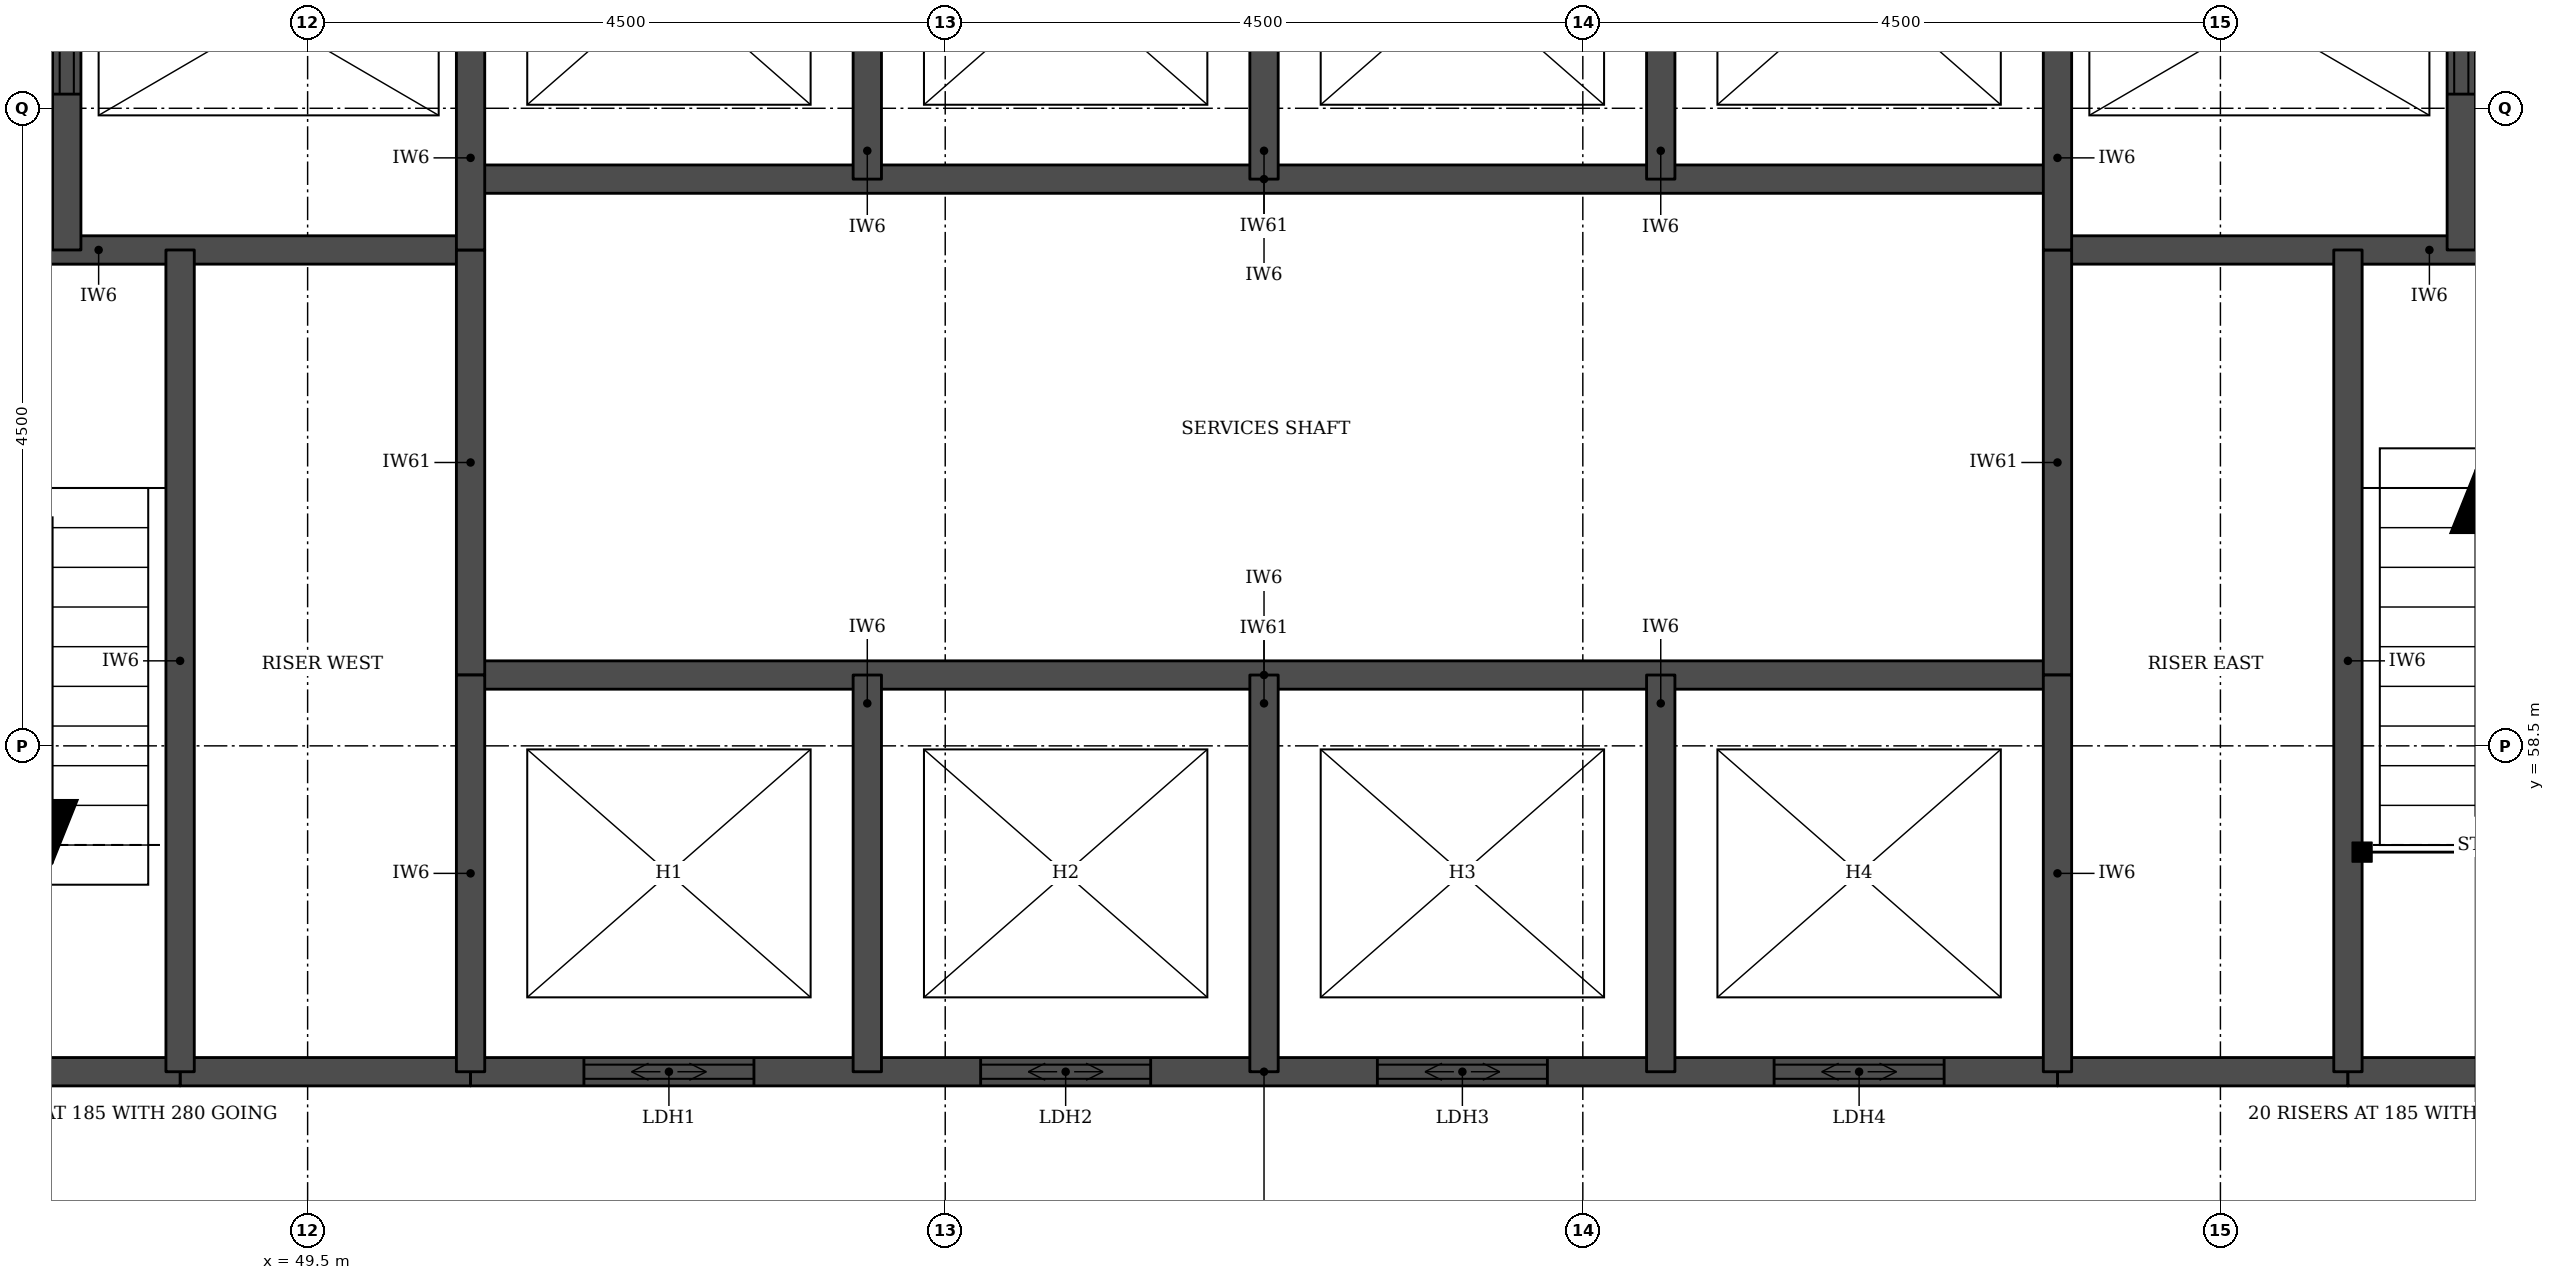
"""IFC4 building model, lengths in metres.
Left out: names, types, materials, properties, quantities, classifications, styles, units other than length and angle.
Written with IfcOpenShell. Run it as: python <this file> out.ifc"""

import sys

from ifc_helpers import new_model, si_unit, direction, frame, frame_2d, origin, place, context, subcontext, project, spatial, rectangle, extrude, element, fill, save


model = new_model("IFC4")
c1 = context("Model", 3, precision=1e-05, world=origin(), true_north=direction((0.0, 1.0)))
c2 = subcontext(c1, "Body", "Model", "MODEL_VIEW")
j1 = project(units=[si_unit("LENGTHUNIT", "METRE"), si_unit("PLANEANGLEUNIT", "RADIAN")], contexts=[c1])
p1 = place(None, origin())
s1 = spatial("IfcSite", under=j1, at=p1, CompositionType="ELEMENT")
p2 = place(p1, origin())
s2 = spatial("IfcBuilding", under=s1, at=p2, CompositionType="ELEMENT")
p3 = place(p2, frame((0.0, 0.0, 260.0)))
s3 = spatial("IfcBuildingStorey", under=s2, at=p3, CompositionType="ELEMENT", Elevation=260.0)
for number, where, z_axis, x_axis in (
    (1, (48.6, 56.2, 0.0), (0.0, 0.0, 1.0), (1.0, 0.0, 0.0)),
    (2, (61.85, 56.2, 0.0), (0.0, 0.0, 1.0), (1.0, 0.0, 0.0)),
):
    element("IfcWall", number, at=place(p3, frame(where, z_axis=z_axis, x_axis=x_axis)), inside=s3, PredefinedType="SOLIDWALL", context=c2, shape_type="SweptSolid", body=[
        extrude(rectangle(XDim=2.05, YDim=0.2, at=frame_2d((1.025, 0.0))), origin(), (0.0, 0.0, 1.0), 3.45),
    ])
p4 = place(p3, frame((45.4, 56.2, 0.0), z_axis=(0.0, 0.0, 1.0), x_axis=(1.0, 0.0, 0.0)))
e3 = element("IfcWall", 3, at=p4, inside=s3, PredefinedType="SOLIDWALL", context=c2, shape_type="SweptSolid", body=[
    extrude(rectangle(XDim=3.2, YDim=0.2, at=frame_2d((1.6, 0.0))), origin(), (0.0, 0.0, 1.0), 3.45),
])
p5 = place(p3, frame((50.65, 56.2, 0.0), z_axis=(0.0, 0.0, 1.0), x_axis=(1.0, 0.0, 0.0)))
e4 = element("IfcWall", 4, at=p5, inside=s3, PredefinedType="SOLIDWALL", context=c2, shape_type="SweptSolid", body=[
    extrude(rectangle(XDim=11.2, YDim=0.2, at=frame_2d((5.6, 0.0))), origin(), (0.0, 0.0, 1.0), 3.45),
])
p6 = place(p5, frame((0.8, 0.0, 0.0)))
e5 = element("IfcOpeningElement", 5, at=p6, cuts=e4, PredefinedType="OPENING", context=c2, shape_type="SweptSolid", body=[
    extrude(rectangle(XDim=1.2, YDim=2.1, at=frame_2d((0.6, 1.05))), frame((0.0, 0.11, 0.0), z_axis=(0.0, -1.0, 0.0), x_axis=(1.0, 0.0, 0.0)), (0.0, 0.0, 1.0), 0.22),
])
p7 = place(p5, frame((3.6, 0.0, 0.0)))
e6 = element("IfcOpeningElement", 6, at=p7, cuts=e4, PredefinedType="OPENING", context=c2, shape_type="SweptSolid", body=[
    extrude(rectangle(XDim=1.2, YDim=2.1, at=frame_2d((0.6, 1.05))), frame((0.0, 0.11, 0.0), z_axis=(0.0, -1.0, 0.0), x_axis=(1.0, 0.0, 0.0)), (0.0, 0.0, 1.0), 0.22),
])
p8 = place(p5, frame((6.4, 0.0, 0.0)))
e7 = element("IfcOpeningElement", 7, at=p8, cuts=e4, PredefinedType="OPENING", context=c2, shape_type="SweptSolid", body=[
    extrude(rectangle(XDim=1.2, YDim=2.1, at=frame_2d((0.6, 1.05))), frame((0.0, 0.11, 0.0), z_axis=(0.0, -1.0, 0.0), x_axis=(1.0, 0.0, 0.0)), (0.0, 0.0, 1.0), 0.22),
])
p9 = place(p5, frame((9.2, 0.0, 0.0)))
e8 = element("IfcOpeningElement", 8, at=p9, cuts=e4, PredefinedType="OPENING", context=c2, shape_type="SweptSolid", body=[
    extrude(rectangle(XDim=1.2, YDim=2.1, at=frame_2d((0.6, 1.05))), frame((0.0, 0.11, 0.0), z_axis=(0.0, -1.0, 0.0), x_axis=(1.0, 0.0, 0.0)), (0.0, 0.0, 1.0), 0.22),
])
p10 = place(p3, frame((63.9, 56.2, 0.0), z_axis=(0.0, 0.0, 1.0), x_axis=(1.0, 0.0, 0.0)))
e9 = element("IfcWall", 9, at=p10, inside=s3, PredefinedType="SOLIDWALL", context=c2, shape_type="SweptSolid", body=[
    extrude(rectangle(XDim=3.2, YDim=0.2, at=frame_2d((1.6, 0.0))), origin(), (0.0, 0.0, 1.0), 3.45),
])
p11 = place(p3, frame((50.65, 59.0, 0.0), z_axis=(0.0, 0.0, 1.0), x_axis=(1.0, 0.0, 0.0)))
e10 = element("IfcWall", 10, at=p11, inside=s3, PredefinedType="SOLIDWALL", context=c2, shape_type="SweptSolid", body=[
    extrude(rectangle(XDim=11.2, YDim=0.2, at=frame_2d((5.6, 0.0))), origin(), (0.0, 0.0, 1.0), 3.7),
])
for number, where, z_axis, x_axis in (
    (11, (45.4, 62.0, 0.0), (0.0, 0.0, 1.0), (1.0, 0.0, 0.0)),
    (12, (61.85, 62.0, 0.0), (0.0, 0.0, 1.0), (1.0, 0.0, 0.0)),
):
    element("IfcWall", number, at=place(p3, frame(where, z_axis=z_axis, x_axis=x_axis)), inside=s3, PredefinedType="SOLIDWALL", context=c2, shape_type="SweptSolid", body=[
        extrude(rectangle(XDim=5.25, YDim=0.2, at=frame_2d((2.625, 0.0))), origin(), (0.0, 0.0, 1.0), 3.45),
    ])
p12 = place(p3, frame((50.65, 62.5, 0.0), z_axis=(0.0, 0.0, 1.0), x_axis=(1.0, 0.0, 0.0)))
e13 = element("IfcWall", 13, at=p12, inside=s3, PredefinedType="SOLIDWALL", context=c2, shape_type="SweptSolid", body=[
    extrude(rectangle(XDim=11.2, YDim=0.2, at=frame_2d((5.6, 0.0))), origin(), (0.0, 0.0, 1.0), 3.7),
])
p13 = place(p3, frame((47.8, 62.0, 0.0), z_axis=(0.0, 0.0, 1.0), x_axis=(0.0, 1.0, 0.0)))
e14 = element("IfcWall", 14, at=p13, inside=s3, PredefinedType="SOLIDWALL", context=c2, shape_type="SweptSolid", body=[
    extrude(rectangle(XDim=3.3, YDim=0.2, at=frame_2d((1.65, 0.0))), origin(), (0.0, 0.0, 1.0), 3.45),
])
p14 = place(p13, frame((1.1, 0.0, 0.0)))
e15 = element("IfcOpeningElement", 15, at=p14, cuts=e14, PredefinedType="OPENING", context=c2, shape_type="SweptSolid", body=[
    extrude(rectangle(XDim=1.1, YDim=2.1, at=frame_2d((0.55, 1.05))), frame((0.0, 0.11, 0.0), z_axis=(0.0, -1.0, 0.0), x_axis=(1.0, 0.0, 0.0)), (0.0, 0.0, 1.0), 0.22),
])
p15 = place(p3, frame((48.6, 56.2, 0.0), z_axis=(0.0, 0.0, 1.0), x_axis=(0.0, 1.0, 0.0)))
e16 = element("IfcWall", 16, at=p15, inside=s3, PredefinedType="SOLIDWALL", context=c2, shape_type="SweptSolid", body=[
    extrude(rectangle(XDim=5.8, YDim=0.2, at=frame_2d((2.9, 0.0))), origin(), (0.0, 0.0, 1.0), 3.45),
])
p16 = place(p3, frame((50.65, 59.0, 0.0), z_axis=(0.0, 0.0, 1.0), x_axis=(0.0, 1.0, 0.0)))
e17 = element("IfcWall", 17, at=p16, inside=s3, PredefinedType="SOLIDWALL", context=c2, shape_type="SweptSolid", body=[
    extrude(rectangle(XDim=3.0, YDim=0.2, at=frame_2d((1.5, 0.0))), origin(), (0.0, 0.0, 1.0), 3.7),
])
p17 = place(p3, frame((50.65, 56.2, 0.0), z_axis=(0.0, 0.0, 1.0), x_axis=(0.0, 1.0, 0.0)))
e18 = element("IfcWall", 18, at=p17, inside=s3, PredefinedType="SOLIDWALL", context=c2, shape_type="SweptSolid", body=[
    extrude(rectangle(XDim=2.8, YDim=0.2, at=frame_2d((1.4, 0.0))), origin(), (0.0, 0.0, 1.0), 3.45),
])
p18 = place(p3, frame((50.65, 62.0, 0.0), z_axis=(0.0, 0.0, 1.0), x_axis=(0.0, 1.0, 0.0)))
e19 = element("IfcWall", 19, at=p18, inside=s3, PredefinedType="SOLIDWALL", context=c2, shape_type="SweptSolid", body=[
    extrude(rectangle(XDim=3.3, YDim=0.2, at=frame_2d((1.65, 0.0))), origin(), (0.0, 0.0, 1.0), 3.45),
])
for number, where, z_axis, x_axis in (
    (20, (53.45, 56.2, 0.0), (0.0, 0.0, 1.0), (0.0, 1.0, 0.0)),
    (21, (53.45, 62.5, 0.0), (0.0, 0.0, 1.0), (0.0, 1.0, 0.0)),
    (22, (56.25, 56.2, 0.0), (0.0, 0.0, 1.0), (0.0, 1.0, 0.0)),
    (23, (56.25, 62.5, 0.0), (0.0, 0.0, 1.0), (0.0, 1.0, 0.0)),
    (24, (59.05, 56.2, 0.0), (0.0, 0.0, 1.0), (0.0, 1.0, 0.0)),
    (25, (59.05, 62.5, 0.0), (0.0, 0.0, 1.0), (0.0, 1.0, 0.0)),
):
    element("IfcWall", number, at=place(p3, frame(where, z_axis=z_axis, x_axis=x_axis)), inside=s3, PredefinedType="SOLIDWALL", context=c2, shape_type="SweptSolid", body=[
        extrude(rectangle(XDim=2.8, YDim=0.2, at=frame_2d((1.4, 0.0))), origin(), (0.0, 0.0, 1.0), 3.45),
    ])
p19 = place(p3, frame((61.85, 59.0, 0.0), z_axis=(0.0, 0.0, 1.0), x_axis=(0.0, 1.0, 0.0)))
e26 = element("IfcWall", 26, at=p19, inside=s3, PredefinedType="SOLIDWALL", context=c2, shape_type="SweptSolid", body=[
    extrude(rectangle(XDim=3.0, YDim=0.2, at=frame_2d((1.5, 0.0))), origin(), (0.0, 0.0, 1.0), 3.7),
])
p20 = place(p3, frame((61.85, 56.2, 0.0), z_axis=(0.0, 0.0, 1.0), x_axis=(0.0, 1.0, 0.0)))
e27 = element("IfcWall", 27, at=p20, inside=s3, PredefinedType="SOLIDWALL", context=c2, shape_type="SweptSolid", body=[
    extrude(rectangle(XDim=2.8, YDim=0.2, at=frame_2d((1.4, 0.0))), origin(), (0.0, 0.0, 1.0), 3.45),
])
p21 = place(p3, frame((61.85, 62.0, 0.0), z_axis=(0.0, 0.0, 1.0), x_axis=(0.0, 1.0, 0.0)))
e28 = element("IfcWall", 28, at=p21, inside=s3, PredefinedType="SOLIDWALL", context=c2, shape_type="SweptSolid", body=[
    extrude(rectangle(XDim=3.3, YDim=0.2, at=frame_2d((1.65, 0.0))), origin(), (0.0, 0.0, 1.0), 3.45),
])
p22 = place(p3, frame((63.9, 56.2, 0.0), z_axis=(0.0, 0.0, 1.0), x_axis=(0.0, 1.0, 0.0)))
e29 = element("IfcWall", 29, at=p22, inside=s3, PredefinedType="SOLIDWALL", context=c2, shape_type="SweptSolid", body=[
    extrude(rectangle(XDim=5.8, YDim=0.2, at=frame_2d((2.9, 0.0))), origin(), (0.0, 0.0, 1.0), 3.45),
])
p23 = place(p3, frame((64.7, 62.0, 0.0), z_axis=(0.0, 0.0, 1.0), x_axis=(0.0, 1.0, 0.0)))
e30 = element("IfcWall", 30, at=p23, inside=s3, PredefinedType="SOLIDWALL", context=c2, shape_type="SweptSolid", body=[
    extrude(rectangle(XDim=3.3, YDim=0.2, at=frame_2d((1.65, 0.0))), origin(), (0.0, 0.0, 1.0), 3.45),
])
p24 = place(p23, frame((1.1, 0.0, 0.0)))
e31 = element("IfcOpeningElement", 31, at=p24, cuts=e30, PredefinedType="OPENING", context=c2, shape_type="SweptSolid", body=[
    extrude(rectangle(XDim=1.1, YDim=2.1, at=frame_2d((0.55, 1.05))), frame((0.0, 0.11, 0.0), z_axis=(0.0, -1.0, 0.0), x_axis=(1.0, 0.0, 0.0)), (0.0, 0.0, 1.0), 0.22),
])
p25 = place(p6, origin())
e32 = element("IfcDoor", 32, at=p25, inside=s3, OperationType="DOUBLE_DOOR_SLIDING", PredefinedType="DOOR", context=c2, shape_type="SweptSolid", body=[
    extrude(rectangle(XDim=1.2, YDim=2.1, at=frame_2d((0.6, 1.05))), frame((0.0, 0.025, 0.0), z_axis=(0.0, -1.0, 0.0), x_axis=(1.0, 0.0, 0.0)), (0.0, 0.0, 1.0), 0.05),
])
fill(e5, e32)
p26 = place(p7, origin())
e33 = element("IfcDoor", 33, at=p26, inside=s3, OperationType="DOUBLE_DOOR_SLIDING", PredefinedType="DOOR", context=c2, shape_type="SweptSolid", body=[
    extrude(rectangle(XDim=1.2, YDim=2.1, at=frame_2d((0.6, 1.05))), frame((0.0, 0.025, 0.0), z_axis=(0.0, -1.0, 0.0), x_axis=(1.0, 0.0, 0.0)), (0.0, 0.0, 1.0), 0.05),
])
fill(e6, e33)
p27 = place(p8, origin())
e34 = element("IfcDoor", 34, at=p27, inside=s3, OperationType="DOUBLE_DOOR_SLIDING", PredefinedType="DOOR", context=c2, shape_type="SweptSolid", body=[
    extrude(rectangle(XDim=1.2, YDim=2.1, at=frame_2d((0.6, 1.05))), frame((0.0, 0.025, 0.0), z_axis=(0.0, -1.0, 0.0), x_axis=(1.0, 0.0, 0.0)), (0.0, 0.0, 1.0), 0.05),
])
fill(e7, e34)
p28 = place(p9, origin())
e35 = element("IfcDoor", 35, at=p28, inside=s3, OperationType="DOUBLE_DOOR_SLIDING", PredefinedType="DOOR", context=c2, shape_type="SweptSolid", body=[
    extrude(rectangle(XDim=1.2, YDim=2.1, at=frame_2d((0.6, 1.05))), frame((0.0, 0.025, 0.0), z_axis=(0.0, -1.0, 0.0), x_axis=(1.0, 0.0, 0.0)), (0.0, 0.0, 1.0), 0.05),
])
fill(e8, e35)
p29 = place(p14, origin())
e36 = element("IfcDoor", 36, at=p29, inside=s3, OperationType="DOUBLE_DOOR_SLIDING", PredefinedType="DOOR", context=c2, shape_type="SweptSolid", body=[
    extrude(rectangle(XDim=1.1, YDim=2.1, at=frame_2d((0.55, 1.05))), frame((0.0, 0.025, 0.0), z_axis=(0.0, -1.0, 0.0), x_axis=(1.0, 0.0, 0.0)), (0.0, 0.0, 1.0), 0.05),
])
fill(e15, e36)
p30 = place(p24, origin())
e37 = element("IfcDoor", 37, at=p30, inside=s3, OperationType="DOUBLE_DOOR_SLIDING", PredefinedType="DOOR", context=c2, shape_type="SweptSolid", body=[
    extrude(rectangle(XDim=1.1, YDim=2.1, at=frame_2d((0.55, 1.05))), frame((0.0, 0.025, 0.0), z_axis=(0.0, -1.0, 0.0), x_axis=(1.0, 0.0, 0.0)), (0.0, 0.0, 1.0), 0.05),
])
fill(e31, e37)
save(model, sys.argv[1])
